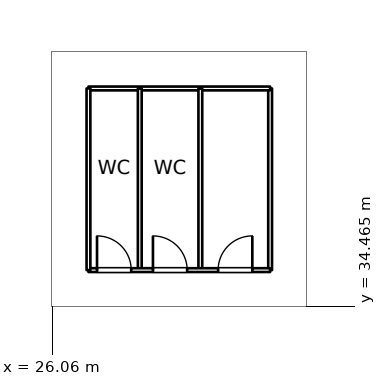
"""IFC4 building model, lengths in metres.
Left out: names, types, materials, properties, quantities, classifications, styles, units other than length and angle.
Written with IfcOpenShell. Run it as: python <this file> out.ifc"""

import sys

from ifc_helpers import new_model, si_unit, direction, frame, frame_2d, origin, place, context, subcontext, project, spatial, rectangle, extrude, element, fill, save


model = new_model("IFC4")
c1 = context("Model", 3, precision=1e-05, world=origin(), true_north=direction((0.0, 1.0)))
c2 = subcontext(c1, "Body", "Model", "MODEL_VIEW")
j1 = project(units=[si_unit("LENGTHUNIT", "METRE"), si_unit("PLANEANGLEUNIT", "RADIAN")], contexts=[c1])
p1 = place(None, origin())
s1 = spatial("IfcSite", under=j1, at=p1, CompositionType="ELEMENT")
p2 = place(p1, origin())
s2 = spatial("IfcBuilding", under=s1, at=p2, CompositionType="ELEMENT")
p3 = place(p2, frame((0.0, 0.0, 6.0)))
s3 = spatial("IfcBuildingStorey", under=s2, at=p3, CompositionType="ELEMENT", Elevation=6.0)
p4 = place(p3, frame((27.01, 35.41, 0.0), z_axis=(0.0, 0.0, 1.0), x_axis=(1.0, 0.0, 0.0)))
e1 = element("IfcWall", 1, at=p4, inside=s3, PredefinedType="PARTITIONING", context=c2, shape_type="SweptSolid", body=[
    extrude(rectangle(XDim=4.78, YDim=0.1, at=frame_2d((2.39, 0.0))), origin(), (0.0, 0.0, 1.0), 4.7),
])
p5 = place(p4, frame((0.225, 0.0, 0.0)))
e2 = element("IfcOpeningElement", 2, at=p5, cuts=e1, PredefinedType="OPENING", context=c2, shape_type="SweptSolid", body=[
    extrude(rectangle(XDim=0.9, YDim=2.1, at=frame_2d((0.45, 1.05))), frame((0.0, 0.06, 0.0), z_axis=(0.0, -1.0, 0.0), x_axis=(1.0, 0.0, 0.0)), (0.0, 0.0, 1.0), 0.12),
])
p6 = place(p4, frame((1.697, 0.0, 0.0)))
e3 = element("IfcOpeningElement", 3, at=p6, cuts=e1, PredefinedType="OPENING", context=c2, shape_type="SweptSolid", body=[
    extrude(rectangle(XDim=0.9, YDim=2.1, at=frame_2d((0.45, 1.05))), frame((0.0, 0.06, 0.0), z_axis=(0.0, -1.0, 0.0), x_axis=(1.0, 0.0, 0.0)), (0.0, 0.0, 1.0), 0.12),
])
p7 = place(p4, frame((3.412, 0.0, 0.0)))
e4 = element("IfcOpeningElement", 4, at=p7, cuts=e1, PredefinedType="OPENING", context=c2, shape_type="SweptSolid", body=[
    extrude(rectangle(XDim=0.9, YDim=2.1, at=frame_2d((0.45, 1.05))), frame((0.0, 0.06, 0.0), z_axis=(0.0, -1.0, 0.0), x_axis=(1.0, 0.0, 0.0)), (0.0, 0.0, 1.0), 0.12),
])
for number, where, z_axis, x_axis in (
    (5, (31.79, 35.41, 0.0), (0.0, 0.0, 1.0), (0.0, 1.0, 0.0)),
    (6, (31.79, 40.19, 0.0), (0.0, 0.0, 1.0), (-1.0, 0.0, 0.0)),
    (7, (27.01, 40.19, 0.0), (0.0, 0.0, 1.0), (0.0, -1.0, 0.0)),
    (8, (28.36, 35.41, 0.0), (0.0, 0.0, 1.0), (0.0, 1.0, 0.0)),
    (9, (29.954, 35.41, 0.0), (0.0, 0.0, 1.0), (0.0, 1.0, 0.0)),
):
    element("IfcWall", number, at=place(p3, frame(where, z_axis=z_axis, x_axis=x_axis)), inside=s3, PredefinedType="PARTITIONING", context=c2, shape_type="SweptSolid", body=[
        extrude(rectangle(XDim=4.78, YDim=0.1, at=frame_2d((2.39, 0.0))), origin(), (0.0, 0.0, 1.0), 4.7),
    ])
p8 = place(p5, origin())
e10 = element("IfcDoor", 10, at=p8, inside=s3, OperationType="SINGLE_SWING_LEFT", PredefinedType="DOOR", context=c2, shape_type="SweptSolid", body=[
    extrude(rectangle(XDim=0.9, YDim=2.1, at=frame_2d((0.45, 1.05))), frame((0.0, 0.025, 0.0), z_axis=(0.0, -1.0, 0.0), x_axis=(1.0, 0.0, 0.0)), (0.0, 0.0, 1.0), 0.05),
])
fill(e2, e10)
p9 = place(p6, origin())
e11 = element("IfcDoor", 11, at=p9, inside=s3, OperationType="SINGLE_SWING_LEFT", PredefinedType="DOOR", context=c2, shape_type="SweptSolid", body=[
    extrude(rectangle(XDim=0.9, YDim=2.1, at=frame_2d((0.45, 1.05))), frame((0.0, 0.025, 0.0), z_axis=(0.0, -1.0, 0.0), x_axis=(1.0, 0.0, 0.0)), (0.0, 0.0, 1.0), 0.05),
])
fill(e3, e11)
p10 = place(p7, origin())
e12 = element("IfcDoor", 12, at=p10, inside=s3, OperationType="SINGLE_SWING_RIGHT", PredefinedType="DOOR", context=c2, shape_type="SweptSolid", body=[
    extrude(rectangle(XDim=0.9, YDim=2.1, at=frame_2d((0.45, 1.05))), frame((0.0, 0.025, 0.0), z_axis=(0.0, -1.0, 0.0), x_axis=(1.0, 0.0, 0.0)), (0.0, 0.0, 1.0), 0.05),
])
fill(e4, e12)
save(model, sys.argv[1])
